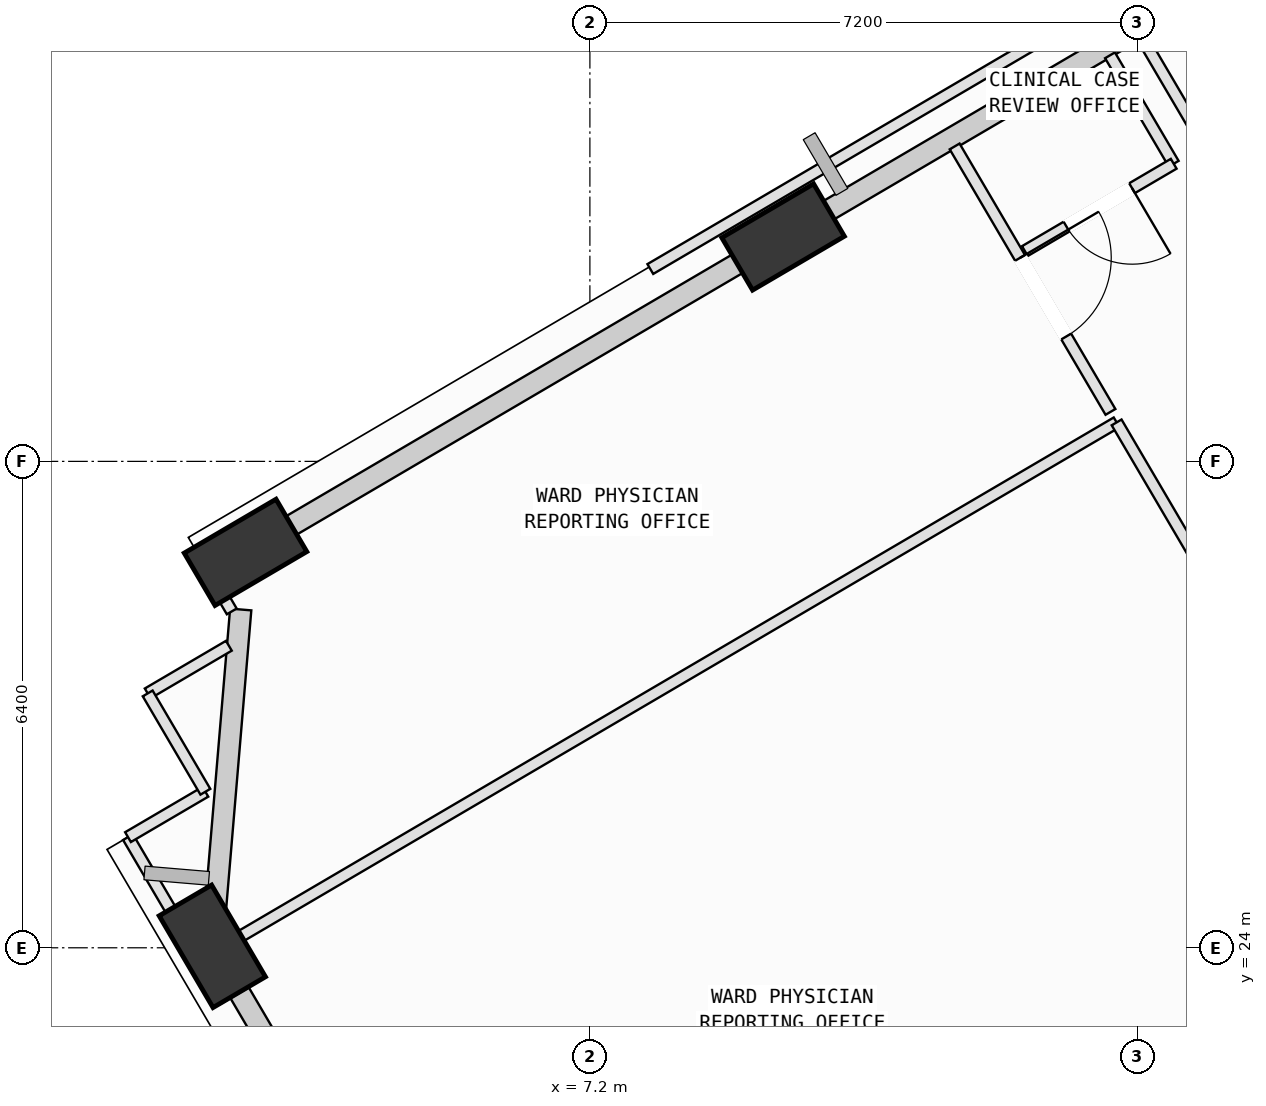
"""IFC4 building model, lengths in metres.
Left out: names, types, materials, properties, quantities, classifications, styles, units other than length and angle.
Written with IfcOpenShell. Run it as: python <this file> out.ifc"""

import sys

from ifc_helpers import new_model, si_unit, direction, frame, frame_2d, origin, origin_2d, place, context, subcontext, project, spatial, rectangle, extrude, element, fill, save


model = new_model("IFC4")
c1 = context("Model", 3, precision=1e-05, world=origin(), true_north=direction((0.0, 1.0)))
c2 = subcontext(c1, "Body", "Model", "MODEL_VIEW")
j1 = project(units=[si_unit("LENGTHUNIT", "METRE"), si_unit("PLANEANGLEUNIT", "RADIAN")], contexts=[c1])
p1 = place(None, origin())
s1 = spatial("IfcSite", under=j1, at=p1, CompositionType="ELEMENT")
p2 = place(p1, origin())
s2 = spatial("IfcBuilding", under=s1, at=p2, CompositionType="ELEMENT")
p3 = place(p2, frame((0.0, 0.0, 153.8)))
s3 = spatial("IfcBuildingStorey", under=s2, at=p3, CompositionType="ELEMENT", Elevation=153.8)
p4 = place(p3, frame((9.742, 33.353, 0.002), z_axis=(-0.034448961233, -0.098668629705, 0.994523891408), x_axis=(0.980197464703, 0.190829958446, 0.052885320728)))
e1 = element("IfcColumn", 1, at=p4, inside=s3, PredefinedType="COLUMN", context=c2, shape_type="SweptSolid", body=[
    extrude(rectangle(XDim=1.4, YDim=0.8, at=origin_2d()), origin(), (0.0, 0.0, 1.0), 4.018),
])
p5 = place(p3, frame((2.669, 29.203, 0.002), z_axis=(-0.017085014726, -0.127289418228, 0.991718461197), x_axis=(0.921607394324, 0.382643519361, 0.064990367119)))
e2 = element("IfcColumn", 2, at=p5, inside=s3, PredefinedType="COLUMN", context=c2, shape_type="SweptSolid", body=[
    extrude(rectangle(XDim=1.4, YDim=0.8, at=origin_2d()), origin(), (0.0, 0.0, 1.0), 4.03),
])
p6 = place(p3, frame((2.232, 24.019, 0.002), z_axis=(0.004301232882, -0.128915824962, 0.991646211847), x_axis=(-0.534273545807, 0.837958489173, 0.111253533308)))
e3 = element("IfcColumn", 3, at=p6, inside=s3, PredefinedType="COLUMN", context=c2, shape_type="SweptSolid", body=[
    extrude(rectangle(XDim=1.4, YDim=0.8, at=origin_2d()), origin(), (0.0, 0.0, 1.0), 4.03),
])
p7 = place(p3, frame((10.015, 33.513, 0.0), z_axis=(0.0, 0.0, 1.0), x_axis=(0.862501326744, 0.506054800753, 0.0)))
e4 = element("IfcWall", 4, at=p7, inside=s3, PredefinedType="SOLIDWALL", context=c2, shape_type="SweptSolid", body=[
    extrude(rectangle(XDim=7.231, YDim=0.28, at=frame_2d((3.615, 0.0))), origin(), (0.0, 0.0, 1.0), 3.165),
])
p8 = place(p3, frame((2.922, 29.352, 0.0), z_axis=(0.0, 0.0, 1.0), x_axis=(0.862524124062, 0.506015943831, 0.0)))
e5 = element("IfcWall", 5, at=p8, inside=s3, PredefinedType="SOLIDWALL", context=c2, shape_type="SweptSolid", body=[
    extrude(rectangle(XDim=7.27, YDim=0.28, at=frame_2d((3.635, 0.0))), origin(), (0.0, 0.0, 1.0), 3.165),
])
p9 = place(p3, frame((2.252, 24.256, 0.0), z_axis=(0.0, 0.0, 1.0), x_axis=(0.083957153569, 0.996469365492, 0.0)))
e6 = element("IfcWall", 6, at=p9, inside=s3, PredefinedType="SOLIDWALL", context=c2, shape_type="SweptSolid", body=[
    extrude(rectangle(XDim=4.211, YDim=0.28, at=frame_2d((2.105, 0.0))), origin(), (0.0, 0.0, 1.0), 3.165),
])
p10 = place(p3, frame((5.439, 18.554, 0.0), z_axis=(0.0, 0.0, 1.0), x_axis=(-0.506043442112, 0.862507991091, 0.0)))
e7 = element("IfcWall", 7, at=p10, inside=s3, PredefinedType="SOLIDWALL", context=c2, shape_type="SweptSolid", body=[
    extrude(rectangle(XDim=5.628, YDim=0.28, at=frame_2d((2.814, 0.0))), origin(), (0.0, 0.0, 1.0), 3.165),
])
p11 = place(p10, frame((2.011, 0.0, 0.75)))
e8 = element("IfcOpeningElement", 8, at=p11, cuts=e7, PredefinedType="OPENING", context=c2, shape_type="SweptSolid", body=[
    extrude(rectangle(XDim=1.6, YDim=1.95, at=frame_2d((0.8, 0.975))), frame((0.0, 0.15, 0.0), z_axis=(0.0, -1.0, 0.0), x_axis=(1.0, 0.0, 0.0)), (0.0, 0.0, 1.0), 0.3),
])
p12 = place(p3, frame((7.025, 16.078, 0.0), z_axis=(0.0, 0.0, 1.0), x_axis=(0.862494790815, 0.506065940186, 0.0)))
e9 = element("IfcWall", 9, at=p12, inside=s3, PredefinedType="PARTITIONING", context=c2, shape_type="SweptSolid", body=[
    extrude(rectangle(XDim=13.635, YDim=0.15, at=frame_2d((6.817, 0.0))), origin(), (0.0, 0.0, 1.0), 3.78),
])
p13 = place(p3, frame((2.072, 23.839, 0.0), z_axis=(0.0, 0.0, 1.0), x_axis=(0.862523991111, 0.506016170452, 0.0)))
e10 = element("IfcWall", 10, at=p13, inside=s3, PredefinedType="PARTITIONING", context=c2, shape_type="SweptSolid", body=[
    extrude(rectangle(XDim=13.98, YDim=0.15, at=frame_2d((6.99, 0.0))), origin(), (0.0, 0.0, 1.0), 3.78),
])
p14 = place(p3, frame((14.13, 30.913, 0.0), z_axis=(0.0, 0.0, 1.0), x_axis=(0.506007110353, -0.862529306327, 0.0)))
e11 = element("IfcWall", 11, at=p14, inside=s3, PredefinedType="PARTITIONING", context=c2, shape_type="SweptSolid", body=[
    extrude(rectangle(XDim=9.04, YDim=0.15, at=frame_2d((4.52, 0.0))), origin(), (0.0, 0.0, 1.0), 3.78),
])
p15 = place(p14, frame((3.92, 0.0, 0.0)))
e12 = element("IfcOpeningElement", 12, at=p15, cuts=e11, PredefinedType="OPENING", context=c2, shape_type="SweptSolid", body=[
    extrude(rectangle(XDim=1.2, YDim=2.15, at=frame_2d((0.6, 1.075))), frame((0.0, 0.085, 0.0), z_axis=(0.0, -1.0, 0.0), x_axis=(1.0, 0.0, 0.0)), (0.0, 0.0, 1.0), 0.17),
])
p16 = place(p3, frame((2.393, 23.292, 0.0), z_axis=(0.0, 0.0, 1.0), x_axis=(-0.506094778374, 0.862477869457, 0.0)))
e13 = element("IfcWall", 13, at=p16, inside=s3, PredefinedType="PARTITIONING", context=c2, shape_type="SweptSolid", body=[
    extrude(rectangle(XDim=0.634, YDim=0.15, at=frame_2d((0.317, 0.0))), origin(), (0.0, 0.0, 1.0), 3.165),
])
p17 = place(p3, frame((1.382, 27.347, 0.0), z_axis=(0.0, 0.0, 1.0), x_axis=(0.862273562312, 0.506442794142, 0.0)))
e14 = element("IfcWall", 14, at=p17, inside=s3, PredefinedType="PARTITIONING", context=c2, shape_type="SweptSolid", body=[
    extrude(rectangle(XDim=1.239, YDim=0.15, at=frame_2d((0.619, 0.0))), origin(), (0.0, 0.0, 1.0), 3.78),
])
p18 = place(p3, frame((2.488, 28.426, 0.0), z_axis=(0.0, 0.0, 1.0), x_axis=(-0.506179488708, 0.86242815655, 0.0)))
e15 = element("IfcWall", 15, at=p18, inside=s3, PredefinedType="PARTITIONING", context=c2, shape_type="SweptSolid", body=[
    extrude(rectangle(XDim=0.749, YDim=0.15, at=frame_2d((0.375, 0.0))), origin(), (0.0, 0.0, 1.0), 3.065),
])
p19 = place(p3, frame((2.109, 29.072, 0.0), z_axis=(0.0, 0.0, 1.0), x_axis=(0.862789487329, 0.505563349694, 0.0)))
e16 = element("IfcWall", 16, at=p19, inside=s3, PredefinedType="PARTITIONING", context=c2, shape_type="SweptSolid", body=[
    extrude(rectangle(XDim=0.843, YDim=0.15, at=frame_2d((0.421, 0.0))), origin(), (0.0, 0.0, 1.0), 3.78),
])
p20 = place(p3, frame((9.106, 33.177, 0.0), z_axis=(0.0, 0.0, 1.0), x_axis=(0.862486191726, 0.506080595442, 0.0)))
e17 = element("IfcWall", 17, at=p20, inside=s3, PredefinedType="PARTITIONING", context=c2, shape_type="SweptSolid", body=[
    extrude(rectangle(XDim=0.954, YDim=0.15, at=frame_2d((0.477, 0.0))), origin(), (0.0, 0.0, 1.0), 3.78),
])
p21 = place(p3, frame((11.999, 34.544, 0.0), z_axis=(0.0, 0.0, 1.0), x_axis=(0.506174252811, -0.862431229601, 0.0)))
e18 = element("IfcWall", 18, at=p21, inside=s3, PredefinedType="PARTITIONING", context=c2, shape_type="SweptSolid", body=[
    extrude(rectangle(XDim=4.05, YDim=0.15, at=frame_2d((2.025, 0.0))), origin(), (0.0, 0.0, 1.0), 3.78),
])
p22 = place(p21, frame((1.7, 0.0, 0.0)))
e19 = element("IfcOpeningElement", 19, at=p22, cuts=e18, PredefinedType="OPENING", context=c2, shape_type="SweptSolid", body=[
    extrude(rectangle(XDim=1.2, YDim=2.15, at=frame_2d((0.6, 1.075))), frame((0.0, 0.085, 0.0), z_axis=(0.0, -1.0, 0.0), x_axis=(1.0, 0.0, 0.0)), (0.0, 0.0, 1.0), 0.17),
])
p23 = place(p3, frame((1.991, 23.977, 0.0), z_axis=(0.0, 0.0, 1.0), x_axis=(-0.506117697831, 0.862464420102, 0.0)))
e20 = element("IfcWall", 20, at=p23, inside=s3, PredefinedType="PARTITIONING", context=c2, shape_type="SweptSolid", body=[
    extrude(rectangle(XDim=1.715, YDim=0.15, at=frame_2d((0.857, 0.0))), origin(), (0.0, 0.0, 1.0), 3.78),
])
p24 = place(p3, frame((1.123, 25.456, 0.0), z_axis=(0.0, 0.0, 1.0), x_axis=(0.862651283186, 0.505799133667, 0.0)))
e21 = element("IfcWall", 21, at=p24, inside=s3, PredefinedType="PARTITIONING", context=c2, shape_type="SweptSolid", body=[
    extrude(rectangle(XDim=1.18, YDim=0.15, at=frame_2d((0.59, 0.0))), origin(), (0.0, 0.0, 1.0), 3.78),
])
p25 = place(p3, frame((2.141, 26.053, 0.0), z_axis=(0.0, 0.0, 1.0), x_axis=(-0.50597425282, 0.86254858152, 0.0)))
e22 = element("IfcWall", 22, at=p25, inside=s3, PredefinedType="PARTITIONING", context=c2, shape_type="SweptSolid", body=[
    extrude(rectangle(XDim=1.5, YDim=0.15, at=frame_2d((0.75, 0.0))), origin(), (0.0, 0.0, 1.0), 3.78),
])
p26 = place(p3, frame((17.076, 31.523, 0.0), z_axis=(0.0, 0.0, 1.0), x_axis=(-0.506089954955, 0.86248069978, 0.0)))
e23 = element("IfcWall", 23, at=p26, inside=s3, PredefinedType="PARTITIONING", context=c2, shape_type="SweptSolid", body=[
    extrude(rectangle(XDim=5.175, YDim=0.15, at=frame_2d((2.587, 0.0))), origin(), (0.0, 0.0, 1.0), 3.78),
])
p27 = place(p26, frame((2.127, 0.0, 0.0)))
e24 = element("IfcOpeningElement", 24, at=p27, cuts=e23, PredefinedType="OPENING", context=c2, shape_type="SweptSolid", body=[
    extrude(rectangle(XDim=0.92, YDim=2.1, at=frame_2d((0.46, 1.05))), frame((0.0, 0.085, 0.0), z_axis=(0.0, -1.0, 0.0), x_axis=(1.0, 0.0, 0.0)), (0.0, 0.0, 1.0), 0.17),
])
p28 = place(p3, frame((7.995, 32.931, 0.0), z_axis=(0.0, 0.0, 1.0), x_axis=(0.86249986981, 0.506057283889, 0.0)))
e25 = element("IfcWall", 25, at=p28, inside=s3, PredefinedType="PARTITIONING", context=c2, shape_type="SweptSolid", body=[
    extrude(rectangle(XDim=6.64, YDim=0.15, at=frame_2d((3.32, 0.0))), origin(), (0.0, 0.0, 1.0), 3.78),
])
p29 = place(p3, frame((14.043, 35.743, 0.0), z_axis=(0.0, 0.0, 1.0), x_axis=(0.50644622965, -0.862271544511, 0.0)))
e26 = element("IfcWall", 26, at=p29, inside=s3, PredefinedType="PARTITIONING", context=c2, shape_type="SweptSolid", body=[
    extrude(rectangle(XDim=1.655, YDim=0.15, at=frame_2d((0.828, 0.0))), origin(), (0.0, 0.0, 1.0), 3.78),
])
p30 = place(p3, frame((14.881, 34.316, 0.0), z_axis=(0.0, 0.0, 1.0), x_axis=(-0.862481095213, -0.506089281056, 0.0)))
e27 = element("IfcWall", 27, at=p30, inside=s3, PredefinedType="PARTITIONING", context=c2, shape_type="SweptSolid", body=[
    extrude(rectangle(XDim=2.27, YDim=0.15, at=frame_2d((1.135, 0.0))), origin(), (0.0, 0.0, 1.0), 3.78),
])
p31 = place(p30, frame((0.635, 0.0, 0.0)))
e28 = element("IfcOpeningElement", 28, at=p31, cuts=e27, PredefinedType="OPENING", context=c2, shape_type="SweptSolid", body=[
    extrude(rectangle(XDim=1.0, YDim=2.12, at=frame_2d((0.5, 1.06))), frame((0.0, 0.085, 0.0), z_axis=(0.0, -1.0, 0.0), x_axis=(1.0, 0.0, 0.0)), (0.0, 0.0, 1.0), 0.17),
])
p32 = place(p22, origin())
e29 = element("IfcDoor", 29, at=p32, inside=s3, OperationType="SINGLE_SWING_LEFT", PredefinedType="DOOR", context=c2, shape_type="SweptSolid", body=[
    extrude(rectangle(XDim=1.2, YDim=2.15, at=frame_2d((0.6, 1.075))), frame((0.0, 0.025, 0.0), z_axis=(0.0, -1.0, 0.0), x_axis=(1.0, 0.0, 0.0)), (0.0, 0.0, 1.0), 0.05),
])
fill(e19, e29)
p33 = place(p31, origin())
e30 = element("IfcDoor", 30, at=p33, inside=s3, OperationType="SINGLE_SWING_LEFT", PredefinedType="DOOR", context=c2, shape_type="SweptSolid", body=[
    extrude(rectangle(XDim=1.0, YDim=2.12, at=frame_2d((0.5, 1.06))), frame((0.0, 0.025, 0.0), z_axis=(0.0, -1.0, 0.0), x_axis=(1.0, 0.0, 0.0)), (0.0, 0.0, 1.0), 0.05),
])
fill(e28, e30)
save(model, sys.argv[1])
